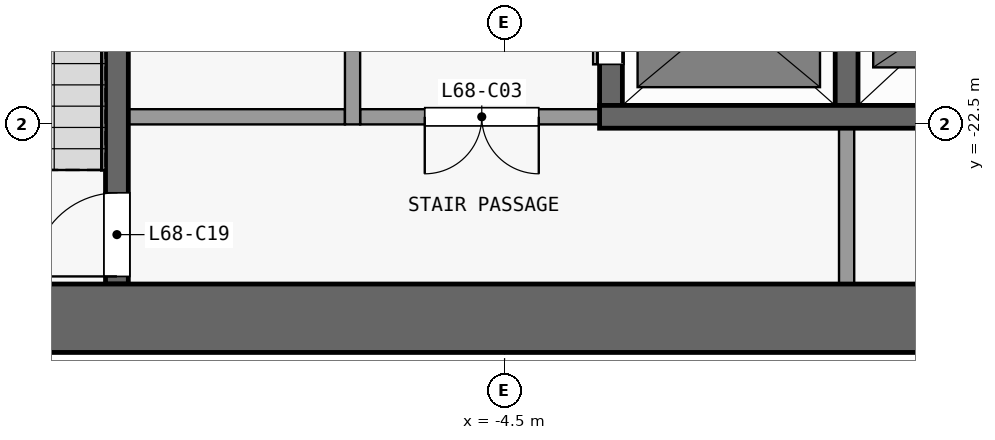
"""IFC4 building model, lengths in metres.
Left out: names, types, materials, properties, quantities, classifications, styles, units other than length and angle.
Written with IfcOpenShell. Run it as: python <this file> out.ifc"""

import sys

from ifc_helpers import new_model, si_unit, direction, frame, frame_2d, origin, place, context, subcontext, project, spatial, rectangle, extrude, element, fill, save


model = new_model("IFC4")
c1 = context("Model", 3, precision=1e-05, world=origin(), true_north=direction((0.0, 1.0)))
c2 = subcontext(c1, "Body", "Model", "MODEL_VIEW")
j1 = project(units=[si_unit("LENGTHUNIT", "METRE"), si_unit("PLANEANGLEUNIT", "RADIAN")], contexts=[c1])
p1 = place(None, origin())
s1 = spatial("IfcSite", under=j1, at=p1, CompositionType="ELEMENT")
p2 = place(p1, origin())
s2 = spatial("IfcBuilding", under=s1, at=p2, CompositionType="ELEMENT")
p3 = place(p2, frame((0.0, 0.0, 269.9)))
s3 = spatial("IfcBuildingStorey", under=s2, at=p3, CompositionType="ELEMENT", Elevation=269.9)
p4 = place(p3, frame((-13.1, -25.05, 0.0), z_axis=(0.0, 0.0, 1.0), x_axis=(1.0, 0.0, 0.0)))
e1 = element("IfcWall", 1, at=p4, inside=s3, PredefinedType="SHEAR", context=c2, shape_type="SweptSolid", body=[
    extrude(rectangle(XDim=26.2, YDim=0.9, at=frame_2d((13.1, 0.0))), origin(), (0.0, 0.0, 1.0), 3.3),
])
p5 = place(p3, frame((-9.45, -22.4, 0.0), z_axis=(0.0, 0.0, 1.0), x_axis=(1.0, 0.0, 0.0)))
e2 = element("IfcWall", 2, at=p5, inside=s3, PredefinedType="PARTITIONING", context=c2, shape_type="SweptSolid", body=[
    extrude(rectangle(XDim=2.85, YDim=0.2, at=frame_2d((1.425, 0.0))), origin(), (0.0, 0.0, 1.0), 3.3),
])
p6 = place(p3, frame((-3.25, -22.4, 0.0), z_axis=(0.0, 0.0, 1.0), x_axis=(-1.0, 0.0, 0.0)))
e3 = element("IfcWall", 3, at=p6, inside=s3, PredefinedType="PARTITIONING", context=c2, shape_type="SweptSolid", body=[
    extrude(rectangle(XDim=3.15, YDim=0.2, at=frame_2d((1.575, 0.0))), origin(), (0.0, 0.0, 1.0), 3.3),
])
p7 = place(p6, frame((0.8, 0.0, 0.0)))
e4 = element("IfcOpeningElement", 4, at=p7, cuts=e3, PredefinedType="OPENING", context=c2, shape_type="SweptSolid", body=[
    extrude(rectangle(XDim=1.5, YDim=2.1, at=frame_2d((0.75, 1.05))), frame((0.0, 0.11, 0.0), z_axis=(0.0, -1.0, 0.0), x_axis=(1.0, 0.0, 0.0)), (0.0, 0.0, 1.0), 0.22),
])
p8 = place(p3, frame((-3.25, -22.4, 0.0), z_axis=(0.0, 0.0, 1.0), x_axis=(1.0, 0.0, 0.0)))
e5 = element("IfcWall", 5, at=p8, inside=s3, PredefinedType="SHEAR", context=c2, shape_type="SweptSolid", body=[
    extrude(rectangle(XDim=6.5, YDim=0.3, at=frame_2d((3.25, 0.0))), origin(), (0.0, 0.0, 1.0), 3.3),
])
p9 = place(p3, frame((-9.6, -24.6, 0.0), z_axis=(0.0, 0.0, 1.0), x_axis=(0.0, 1.0, 0.0)))
e6 = element("IfcWall", 6, at=p9, inside=s3, PredefinedType="SHEAR", context=c2, shape_type="SweptSolid", body=[
    extrude(rectangle(XDim=7.7, YDim=0.3, at=frame_2d((3.85, 0.0))), origin(), (0.0, 0.0, 1.0), 3.3),
])
p10 = place(p9, frame((0.1, 0.0, 0.0)))
e7 = element("IfcOpeningElement", 7, at=p10, cuts=e6, PredefinedType="OPENING", context=c2, shape_type="SweptSolid", body=[
    extrude(rectangle(XDim=1.1, YDim=2.1, at=frame_2d((0.55, 1.05))), frame((0.0, 0.16, 0.0), z_axis=(0.0, -1.0, 0.0), x_axis=(1.0, 0.0, 0.0)), (0.0, 0.0, 1.0), 0.32),
])
p11 = place(p3, frame((-6.5, -22.5, 0.0), z_axis=(0.0, 0.0, 1.0), x_axis=(0.0, 1.0, 0.0)))
e8 = element("IfcWall", 8, at=p11, inside=s3, PredefinedType="PARTITIONING", context=c2, shape_type="SweptSolid", body=[
    extrude(rectangle(XDim=8.54, YDim=0.2, at=frame_2d((4.27, 0.0))), origin(), (0.0, 0.0, 1.0), 3.3),
])
p12 = place(p11, frame((3.67, 0.0, 0.0)))
e9 = element("IfcOpeningElement", 9, at=p12, cuts=e8, PredefinedType="OPENING", context=c2, shape_type="SweptSolid", body=[
    extrude(rectangle(XDim=1.2, YDim=2.1, at=frame_2d((0.6, 1.05))), frame((0.0, 0.11, 0.0), z_axis=(0.0, -1.0, 0.0), x_axis=(1.0, 0.0, 0.0)), (0.0, 0.0, 1.0), 0.22),
])
p13 = place(p3, frame((-3.1, -22.25, 0.0), z_axis=(0.0, 0.0, 1.0), x_axis=(0.0, 1.0, 0.0)))
e10 = element("IfcWall", 10, at=p13, inside=s3, PredefinedType="SHEAR", context=c2, shape_type="SweptSolid", body=[
    extrude(rectangle(XDim=2.48, YDim=0.3, at=frame_2d((1.24, 0.0))), origin(), (0.0, 0.0, 1.0), 3.3),
])
p14 = place(p13, frame((0.54, 0.0, 0.0)))
e11 = element("IfcOpeningElement", 11, at=p14, cuts=e10, PredefinedType="OPENING", context=c2, shape_type="SweptSolid", body=[
    extrude(rectangle(XDim=1.4, YDim=2.1, at=frame_2d((0.7, 1.05))), frame((0.0, 0.16, 0.0), z_axis=(0.0, -1.0, 0.0), x_axis=(1.0, 0.0, 0.0)), (0.0, 0.0, 1.0), 0.32),
])
p15 = place(p3, frame((0.0, -24.6, 0.0), z_axis=(0.0, 0.0, 1.0), x_axis=(0.0, 1.0, 0.0)))
e12 = element("IfcWall", 12, at=p15, inside=s3, PredefinedType="PARTITIONING", context=c2, shape_type="SweptSolid", body=[
    extrude(rectangle(XDim=2.05, YDim=0.2, at=frame_2d((1.025, 0.0))), origin(), (0.0, 0.0, 1.0), 3.3),
])
p16 = place(p3, frame((0.0, -22.25, 0.0), z_axis=(0.0, 0.0, 1.0), x_axis=(0.0, 1.0, 0.0)))
e13 = element("IfcWall", 13, at=p16, inside=s3, PredefinedType="SHEAR", context=c2, shape_type="SweptSolid", body=[
    extrude(rectangle(XDim=2.6, YDim=0.3, at=frame_2d((1.3, 0.0))), origin(), (0.0, 0.0, 1.0), 3.3),
])
p17 = place(p14, origin())
e14 = element("IfcDoor", 14, at=p17, inside=s3, OperationType="DOUBLE_DOOR_SLIDING", PredefinedType="DOOR", context=c2, shape_type="SweptSolid", body=[
    extrude(rectangle(XDim=1.4, YDim=2.1, at=frame_2d((0.7, 1.05))), frame((0.0, 0.025, 0.0), z_axis=(0.0, -1.0, 0.0), x_axis=(1.0, 0.0, 0.0)), (0.0, 0.0, 1.0), 0.05),
])
fill(e11, e14)
p18 = place(p7, origin())
e15 = element("IfcDoor", 15, at=p18, inside=s3, OperationType="DOUBLE_DOOR_SINGLE_SWING", PredefinedType="DOOR", context=c2, shape_type="SweptSolid", body=[
    extrude(rectangle(XDim=1.5, YDim=2.1, at=frame_2d((0.75, 1.05))), frame((0.0, 0.025, 0.0), z_axis=(0.0, -1.0, 0.0), x_axis=(1.0, 0.0, 0.0)), (0.0, 0.0, 1.0), 0.05),
])
fill(e4, e15)
p19 = place(p10, origin())
e16 = element("IfcDoor", 16, at=p19, inside=s3, OperationType="SINGLE_SWING_LEFT", PredefinedType="DOOR", context=c2, shape_type="SweptSolid", body=[
    extrude(rectangle(XDim=1.1, YDim=2.1, at=frame_2d((0.55, 1.05))), frame((0.0, 0.025, 0.0), z_axis=(0.0, -1.0, 0.0), x_axis=(1.0, 0.0, 0.0)), (0.0, 0.0, 1.0), 0.05),
])
fill(e7, e16)
save(model, sys.argv[1])
